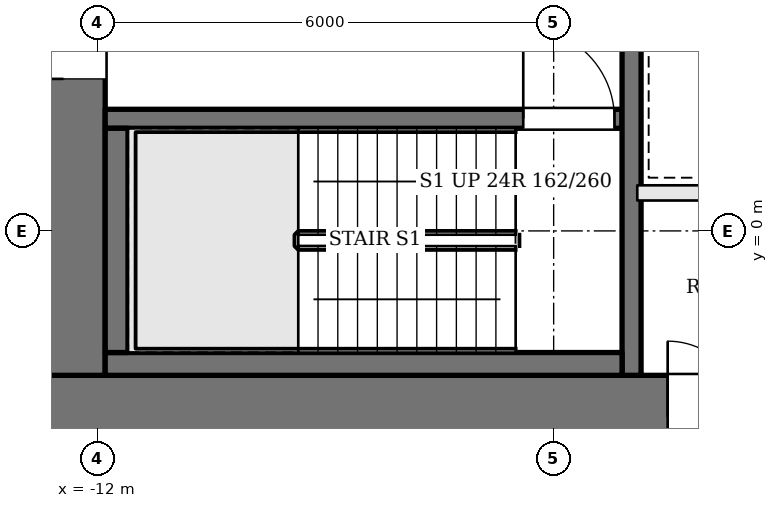
"""IFC4 building model, lengths in metres.
Left out: names, types, materials, properties, quantities, classifications, styles, units other than length and angle.
Written with IfcOpenShell. Run it as: python <this file> out.ifc"""

import sys

from ifc_helpers import new_model, si_unit, direction, frame, frame_2d, origin, place, context, subcontext, project, spatial, rectangle, extrude, element, fill, save


model = new_model("IFC4")
c1 = context("Model", 3, precision=1e-05, world=origin(), true_north=direction((0.0, 1.0)))
c2 = subcontext(c1, "Body", "Model", "MODEL_VIEW")
j1 = project(units=[si_unit("LENGTHUNIT", "METRE"), si_unit("PLANEANGLEUNIT", "RADIAN")], contexts=[c1])
p1 = place(None, origin())
s1 = spatial("IfcSite", under=j1, at=p1, CompositionType="ELEMENT")
p2 = place(p1, origin())
s2 = spatial("IfcBuilding", under=s1, at=p2, CompositionType="ELEMENT")
p3 = place(p2, frame((0.0, 0.0, 157.8)))
s3 = spatial("IfcBuildingStorey", under=s2, at=p3, CompositionType="ELEMENT", Elevation=157.8)
p4 = place(p3, frame((-13.0, -2.45, 0.0), z_axis=(0.0, 0.0, 1.0), x_axis=(1.0, 0.0, 0.0)))
e1 = element("IfcWall", 1, at=p4, inside=s3, PredefinedType="SHEAR", context=c2, shape_type="SweptSolid", body=[
    extrude(rectangle(XDim=26.0, YDim=1.1, at=frame_2d((13.0, 0.0))), origin(), (0.0, 0.0, 1.0), 3.9),
])
p5 = place(p4, frame((8.5, 0.0, 0.0)))
e2 = element("IfcOpeningElement", 2, at=p5, cuts=e1, PredefinedType="OPENING", context=c2, shape_type="SweptSolid", body=[
    extrude(rectangle(XDim=1.0, YDim=2.1, at=frame_2d((0.5, 1.05))), frame((0.0, 0.56, 0.0), z_axis=(0.0, -1.0, 0.0), x_axis=(1.0, 0.0, 0.0)), (0.0, 0.0, 1.0), 1.12),
])
p6 = place(p4, frame((11.025, 0.0, 0.0)))
e3 = element("IfcOpeningElement", 3, at=p6, cuts=e1, PredefinedType="OPENING", context=c2, shape_type="SweptSolid", body=[
    extrude(rectangle(XDim=0.9, YDim=2.1, at=frame_2d((0.45, 1.05))), frame((0.0, 0.56, 0.0), z_axis=(0.0, -1.0, 0.0), x_axis=(1.0, 0.0, 0.0)), (0.0, 0.0, 1.0), 1.12),
])
p7 = place(p4, frame((14.225, 0.0, 0.0)))
e4 = element("IfcOpeningElement", 4, at=p7, cuts=e1, PredefinedType="OPENING", context=c2, shape_type="SweptSolid", body=[
    extrude(rectangle(XDim=0.9, YDim=2.1, at=frame_2d((0.45, 1.05))), frame((0.0, 0.56, 0.0), z_axis=(0.0, -1.0, 0.0), x_axis=(1.0, 0.0, 0.0)), (0.0, 0.0, 1.0), 1.12),
])
p8 = place(p4, frame((16.6, 0.0, 0.0)))
e5 = element("IfcOpeningElement", 5, at=p8, cuts=e1, PredefinedType="OPENING", context=c2, shape_type="SweptSolid", body=[
    extrude(rectangle(XDim=1.0, YDim=2.1, at=frame_2d((0.5, 1.05))), frame((0.0, 0.56, 0.0), z_axis=(0.0, -1.0, 0.0), x_axis=(1.0, 0.0, 0.0)), (0.0, 0.0, 1.0), 1.12),
])
p9 = place(p3, frame((-12.45, -1.9, 0.0), z_axis=(0.0, 0.0, 1.0), x_axis=(0.0, 1.0, 0.0)))
e6 = element("IfcWall", 6, at=p9, inside=s3, PredefinedType="SHEAR", context=c2, shape_type="SweptSolid", body=[
    extrude(rectangle(XDim=12.8, YDim=1.1, at=frame_2d((6.4, 0.0))), origin(), (0.0, 0.0, 1.0), 3.9),
])
p10 = place(p9, frame((3.9, 0.0, 0.0)))
e7 = element("IfcOpeningElement", 7, at=p10, cuts=e6, PredefinedType="OPENING", context=c2, shape_type="SweptSolid", body=[
    extrude(rectangle(XDim=1.8, YDim=2.1, at=frame_2d((0.9, 1.05))), frame((0.0, 0.56, 0.0), z_axis=(0.0, -1.0, 0.0), x_axis=(1.0, 0.0, 0.0)), (0.0, 0.0, 1.0), 1.12),
])
p11 = place(p3, frame((-11.9, 1.475, 0.0), z_axis=(0.0, 0.0, 1.0), x_axis=(1.0, 0.0, 0.0)))
e8 = element("IfcWall", 8, at=p11, inside=s3, PredefinedType="SOLIDWALL", context=c2, shape_type="SweptSolid", body=[
    extrude(rectangle(XDim=6.8, YDim=0.25, at=frame_2d((3.4, 0.0))), origin(), (0.0, 0.0, 1.0), 3.7),
])
p12 = place(p11, frame((5.5, 0.0, 0.0)))
e9 = element("IfcOpeningElement", 9, at=p12, cuts=e8, PredefinedType="OPENING", context=c2, shape_type="SweptSolid", body=[
    extrude(rectangle(XDim=1.2, YDim=2.1, at=frame_2d((0.6, 1.05))), frame((0.0, 0.135, 0.0), z_axis=(0.0, -1.0, 0.0), x_axis=(1.0, 0.0, 0.0)), (0.0, 0.0, 1.0), 0.27),
])
p13 = place(p3, frame((-4.975, -1.9, 0.0), z_axis=(0.0, 0.0, 1.0), x_axis=(0.0, 1.0, 0.0)))
e10 = element("IfcWall", 10, at=p13, inside=s3, PredefinedType="SOLIDWALL", context=c2, shape_type="SweptSolid", body=[
    extrude(rectangle(XDim=12.8, YDim=0.25, at=frame_2d((6.4, 0.0))), origin(), (0.0, 0.0, 1.0), 3.7),
])
p14 = place(p13, frame((4.95, 0.0, 0.0)))
e11 = element("IfcOpeningElement", 11, at=p14, cuts=e10, PredefinedType="OPENING", context=c2, shape_type="SweptSolid", body=[
    extrude(rectangle(XDim=1.2, YDim=2.1, at=frame_2d((0.6, 1.05))), frame((0.0, 0.135, 0.0), z_axis=(0.0, -1.0, 0.0), x_axis=(1.0, 0.0, 0.0)), (0.0, 0.0, 1.0), 0.27),
])
p15 = place(p3, frame((-11.9, -1.75, 0.0), z_axis=(0.0, 0.0, 1.0), x_axis=(1.0, 0.0, 0.0)))
e12 = element("IfcWall", 12, at=p15, inside=s3, PredefinedType="SOLIDWALL", context=c2, shape_type="SweptSolid", body=[
    extrude(rectangle(XDim=6.8, YDim=0.3, at=frame_2d((3.4, 0.0))), origin(), (0.0, 0.0, 1.0), 3.7),
])
p16 = place(p3, frame((-11.75, -1.6, 0.0), z_axis=(0.0, 0.0, 1.0), x_axis=(0.0, 1.0, 0.0)))
e13 = element("IfcWall", 13, at=p16, inside=s3, PredefinedType="SOLIDWALL", context=c2, shape_type="SweptSolid", body=[
    extrude(rectangle(XDim=2.95, YDim=0.3, at=frame_2d((1.475, 0.0))), origin(), (0.0, 0.0, 1.0), 3.7),
])
p17 = place(p3, frame((-4.9, 0.5, 0.0), z_axis=(0.0, 0.0, 1.0), x_axis=(1.0, 0.0, 0.0)))
e14 = element("IfcWall", 14, at=p17, inside=s3, PredefinedType="SOLIDWALL", context=c2, shape_type="SweptSolid", body=[
    extrude(rectangle(XDim=9.8, YDim=0.2, at=frame_2d((4.9, 0.0))), origin(), (0.0, 0.0, 1.0), 3.7),
])
p18 = place(p10, origin())
e15 = element("IfcDoor", 15, at=p18, inside=s3, OperationType="DOUBLE_DOOR_SINGLE_SWING", PredefinedType="DOOR", context=c2, shape_type="SweptSolid", body=[
    extrude(rectangle(XDim=1.8, YDim=2.1, at=frame_2d((0.9, 1.05))), frame((0.0, 0.025, 0.0), z_axis=(0.0, -1.0, 0.0), x_axis=(1.0, 0.0, 0.0)), (0.0, 0.0, 1.0), 0.05),
])
fill(e7, e15)
p19 = place(p12, origin())
e16 = element("IfcDoor", 16, at=p19, inside=s3, OperationType="SINGLE_SWING_LEFT", PredefinedType="DOOR", context=c2, shape_type="SweptSolid", body=[
    extrude(rectangle(XDim=1.2, YDim=2.1, at=frame_2d((0.6, 1.05))), frame((0.0, 0.025, 0.0), z_axis=(0.0, -1.0, 0.0), x_axis=(1.0, 0.0, 0.0)), (0.0, 0.0, 1.0), 0.05),
])
fill(e9, e16)
p20 = place(p5, origin())
e17 = element("IfcDoor", 17, at=p20, inside=s3, OperationType="SINGLE_SWING_LEFT", PredefinedType="DOOR", context=c2, shape_type="SweptSolid", body=[
    extrude(rectangle(XDim=1.0, YDim=2.1, at=frame_2d((0.5, 1.05))), frame((0.0, 0.025, 0.0), z_axis=(0.0, -1.0, 0.0), x_axis=(1.0, 0.0, 0.0)), (0.0, 0.0, 1.0), 0.05),
])
fill(e2, e17)
save(model, sys.argv[1])
